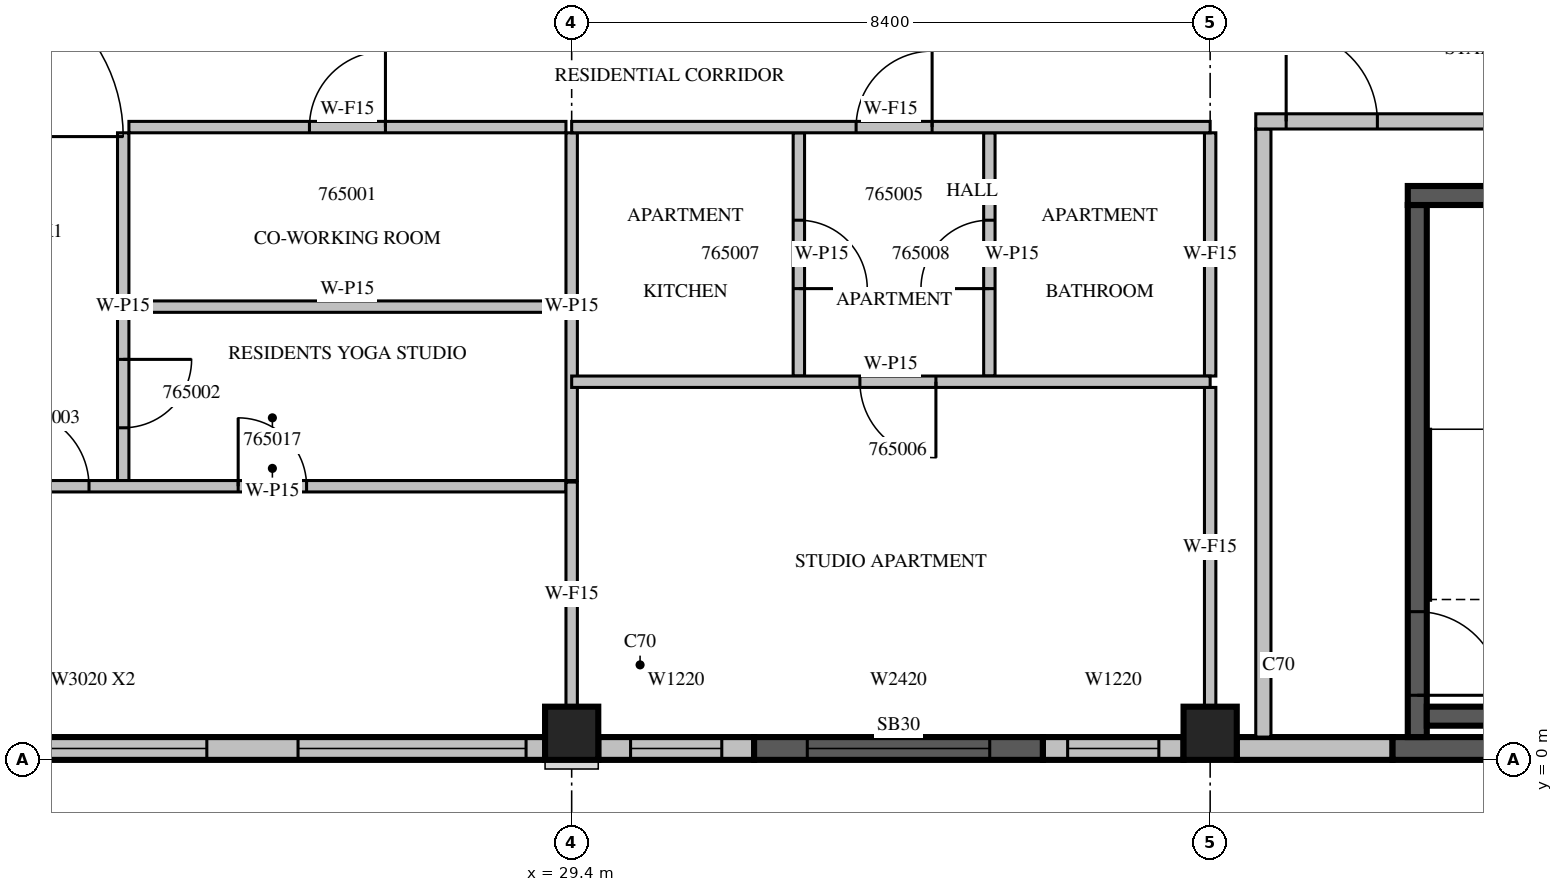
"""IFC4 building model, lengths in metres.
Left out: names, types, materials, properties, quantities, classifications, styles, units other than length and angle.
Written with IfcOpenShell. Run it as: python <this file> out.ifc"""

import sys

from ifc_helpers import new_model, si_unit, direction, frame, frame_2d, origin, origin_2d, place, context, subcontext, project, spatial, rectangle, extrude, source, transform, mapped, element, fill, save


model = new_model("IFC4")
c1 = context("Model", 3, precision=1e-05, world=origin(), true_north=direction((0.0, 1.0)))
c2 = subcontext(c1, "Body", "Model", "MODEL_VIEW")
j1 = project(units=[si_unit("LENGTHUNIT", "METRE"), si_unit("PLANEANGLEUNIT", "RADIAN")], contexts=[c1])
p1 = place(None, origin())
s1 = spatial("IfcSite", under=j1, at=p1, CompositionType="ELEMENT")
p2 = place(p1, origin())
s2 = spatial("IfcBuilding", under=s1, at=p2, CompositionType="ELEMENT")
p3 = place(p2, frame((0.0, 0.0, 288.0)))
s3 = spatial("IfcBuildingStorey", under=s2, at=p3, CompositionType="ELEMENT", Elevation=288.0)
m1 = source(origin(), c2, "Body", "SweptSolid", [
    extrude(rectangle(XDim=0.7, YDim=0.7, at=origin_2d()), origin(), (0.0, 0.0, 1.0), 3.5),
])
for number, where, z_axis, x_axis in (
    (1, (29.4, 0.35, 0.0), (0.0, 0.0, 1.0), (1.0, 0.0, 0.0)),
    (2, (37.8, 0.35, 0.0), (0.0, 0.0, 1.0), (1.0, 0.0, 0.0)),
):
    element("IfcColumn", number, at=place(p3, frame(where, z_axis=z_axis, x_axis=x_axis)), inside=s3, PredefinedType="COLUMN", context=c2, shape_type="MappedRepresentation", body=[
        mapped(m1, transform((0.0, 0.0, 0.0), scale=1.0)),
    ])
m2 = source(origin(), c2, "Body", "SweptSolid", [
    extrude(rectangle(XDim=7.7, YDim=0.3, at=frame_2d((3.85, 0.0))), origin(), (0.0, 0.0, 1.0), 3.1),
])
p4 = place(p3, frame((21.35, 0.15, 0.0), z_axis=(0.0, 0.0, 1.0), x_axis=(1.0, 0.0, 0.0)))
e3 = element("IfcWall", 3, at=p4, inside=s3, PredefinedType="STANDARD", context=c2, shape_type="MappedRepresentation", body=[
    mapped(m2, transform((0.0, 0.0, 0.0), scale=1.0)),
])
m3 = source(origin(), c2, "Body", "SweptSolid", [
    extrude(rectangle(XDim=3.0, YDim=2.0, at=frame_2d((1.5, 1.0))), frame((0.0, 0.16, 0.0), z_axis=(0.0, -1.0, 0.0), x_axis=(1.0, 0.0, 0.0)), (0.0, 0.0, 1.0), 0.32),
])
p5 = place(p4, frame((0.25, 0.0, 0.6)))
e4 = element("IfcOpeningElement", 4, at=p5, cuts=e3, PredefinedType="OPENING", context=c2, shape_type="MappedRepresentation", body=[
    mapped(m3, transform((0.0, 0.0, 0.0), scale=1.0)),
])
p6 = place(p4, frame((4.45, 0.0, 0.6)))
e5 = element("IfcOpeningElement", 5, at=p6, cuts=e3, PredefinedType="OPENING", context=c2, shape_type="MappedRepresentation", body=[
    mapped(m3, transform((0.0, 0.0, 0.0), scale=1.0)),
])
m4 = source(origin(), c2, "Body", "SweptSolid", [
    extrude(rectangle(XDim=2.05, YDim=0.3, at=frame_2d((1.025, 0.0))), origin(), (0.0, 0.0, 1.0), 3.1),
])
p7 = place(p3, frame((29.75, 0.15, 0.0), z_axis=(0.0, 0.0, 1.0), x_axis=(1.0, 0.0, 0.0)))
e6 = element("IfcWall", 6, at=p7, inside=s3, PredefinedType="STANDARD", context=c2, shape_type="MappedRepresentation", body=[
    mapped(m4, transform((0.0, 0.0, 0.0), scale=1.0)),
])
m5 = source(origin(), c2, "Body", "SweptSolid", [
    extrude(rectangle(XDim=1.2, YDim=2.0, at=frame_2d((0.6, 1.0))), frame((0.0, 0.16, 0.0), z_axis=(0.0, -1.0, 0.0), x_axis=(1.0, 0.0, 0.0)), (0.0, 0.0, 1.0), 0.32),
])
p8 = place(p7, frame((0.425, 0.0, 0.6)))
e7 = element("IfcOpeningElement", 7, at=p8, cuts=e6, PredefinedType="OPENING", context=c2, shape_type="MappedRepresentation", body=[
    mapped(m5, transform((0.0, 0.0, 0.0), scale=1.0)),
])
m6 = source(origin(), c2, "Body", "SweptSolid", [
    extrude(rectangle(XDim=3.8, YDim=0.3, at=frame_2d((1.9, 0.0))), origin(), (0.0, 0.0, 1.0), 3.1),
])
p9 = place(p3, frame((31.8, 0.15, 0.0), z_axis=(0.0, 0.0, 1.0), x_axis=(1.0, 0.0, 0.0)))
e8 = element("IfcWall", 8, at=p9, inside=s3, PredefinedType="SOLIDWALL", context=c2, shape_type="MappedRepresentation", body=[
    mapped(m6, transform((0.0, 0.0, 0.0), scale=1.0)),
])
m7 = source(origin(), c2, "Body", "SweptSolid", [
    extrude(rectangle(XDim=2.4, YDim=2.0, at=frame_2d((1.2, 1.0))), frame((0.0, 0.16, 0.0), z_axis=(0.0, -1.0, 0.0), x_axis=(1.0, 0.0, 0.0)), (0.0, 0.0, 1.0), 0.32),
])
p10 = place(p9, frame((0.7, 0.0, 0.6)))
e9 = element("IfcOpeningElement", 9, at=p10, cuts=e8, PredefinedType="OPENING", context=c2, shape_type="MappedRepresentation", body=[
    mapped(m7, transform((0.0, 0.0, 0.0), scale=1.0)),
])
m8 = source(origin(), c2, "Body", "SweptSolid", [
    extrude(rectangle(XDim=1.85, YDim=0.3, at=frame_2d((0.925, 0.0))), origin(), (0.0, 0.0, 1.0), 3.1),
])
p11 = place(p3, frame((35.6, 0.15, 0.0), z_axis=(0.0, 0.0, 1.0), x_axis=(1.0, 0.0, 0.0)))
e10 = element("IfcWall", 10, at=p11, inside=s3, PredefinedType="STANDARD", context=c2, shape_type="MappedRepresentation", body=[
    mapped(m8, transform((0.0, 0.0, 0.0), scale=1.0)),
])
p12 = place(p11, frame((0.325, 0.0, 0.6)))
e11 = element("IfcOpeningElement", 11, at=p12, cuts=e10, PredefinedType="OPENING", context=c2, shape_type="MappedRepresentation", body=[
    mapped(m5, transform((0.0, 0.0, 0.0), scale=1.0)),
])
p13 = place(p3, frame((38.15, 0.15, 0.0), z_axis=(0.0, 0.0, 1.0), x_axis=(1.0, 0.0, 0.0)))
e12 = element("IfcWall", 12, at=p13, inside=s3, PredefinedType="STANDARD", context=c2, shape_type="MappedRepresentation", body=[
    mapped(m4, transform((0.0, 0.0, 0.0), scale=1.0)),
])
p14 = place(p3, frame((40.2, 0.15, 0.0), z_axis=(0.0, 0.0, 1.0), x_axis=(1.0, 0.0, 0.0)))
e13 = element("IfcWall", 13, at=p14, inside=s3, PredefinedType="SOLIDWALL", context=c2, shape_type="MappedRepresentation", body=[
    mapped(m6, transform((0.0, 0.0, 0.0), scale=1.0)),
])
m9 = source(origin(), c2, "Body", "SweptSolid", [
    extrude(rectangle(XDim=7.0, YDim=0.25, at=frame_2d((3.5, 0.0))), origin(), (0.0, 0.0, 1.0), 3.1),
])
p15 = place(p3, frame((40.525, 0.3, 0.0), z_axis=(0.0, 0.0, 1.0), x_axis=(0.0, 1.0, 0.0)))
e14 = element("IfcWall", 14, at=p15, inside=s3, PredefinedType="SOLIDWALL", context=c2, shape_type="MappedRepresentation", body=[
    mapped(m9, transform((0.0, 0.0, 0.0), scale=1.0)),
])
m10 = source(origin(), c2, "Body", "SweptSolid", [
    extrude(rectangle(XDim=1.1, YDim=2.1, at=frame_2d((0.55, 1.05))), frame((0.0, 0.135, 0.0), z_axis=(0.0, -1.0, 0.0), x_axis=(1.0, 0.0, 0.0)), (0.0, 0.0, 1.0), 0.27),
])
p16 = place(p15, frame((0.55, 0.0, 0.0)))
e15 = element("IfcOpeningElement", 15, at=p16, cuts=e14, PredefinedType="OPENING", context=c2, shape_type="MappedRepresentation", body=[
    mapped(m10, transform((0.0, 0.0, 0.0), scale=1.0)),
])
m11 = source(origin(), c2, "Body", "SweptSolid", [
    extrude(rectangle(XDim=3.45, YDim=0.25, at=frame_2d((1.725, 0.0))), origin(), (0.0, 0.0, 1.0), 3.1),
])
p17 = place(p3, frame((40.4, 7.425, 0.0), z_axis=(0.0, 0.0, 1.0), x_axis=(1.0, 0.0, 0.0)))
e16 = element("IfcWall", 16, at=p17, inside=s3, PredefinedType="SOLIDWALL", context=c2, shape_type="MappedRepresentation", body=[
    mapped(m11, transform((0.0, 0.0, 0.0), scale=1.0)),
])
m12 = source(origin(), c2, "Body", "SweptSolid", [
    extrude(rectangle(XDim=2.95, YDim=0.25, at=frame_2d((1.475, 0.0))), origin(), (0.0, 0.0, 1.0), 3.1),
])
p18 = place(p3, frame((40.65, 0.575, 0.0), z_axis=(0.0, 0.0, 1.0), x_axis=(1.0, 0.0, 0.0)))
e17 = element("IfcWall", 17, at=p18, inside=s3, PredefinedType="SOLIDWALL", context=c2, shape_type="MappedRepresentation", body=[
    mapped(m12, transform((0.0, 0.0, 0.0), scale=1.0)),
])
m13 = source(origin(), c2, "Body", "SweptSolid", [
    extrude(rectangle(XDim=8.0, YDim=0.2, at=frame_2d((4.0, 0.0))), origin(), (0.0, 0.0, 1.0), 3.1),
])
p19 = place(p3, frame((38.5, 0.3, 0.0), z_axis=(0.0, 0.0, 1.0), x_axis=(0.0, 1.0, 0.0)))
e18 = element("IfcWall", 18, at=p19, inside=s3, PredefinedType="PARTITIONING", context=c2, shape_type="MappedRepresentation", body=[
    mapped(m13, transform((0.0, 0.0, 0.0), scale=1.0)),
])
m14 = source(origin(), c2, "Body", "SweptSolid", [
    extrude(rectangle(XDim=5.45, YDim=0.2, at=frame_2d((2.725, 0.0))), origin(), (0.0, 0.0, 1.0), 3.1),
])
p20 = place(p3, frame((38.4, 8.4, 0.0), z_axis=(0.0, 0.0, 1.0), x_axis=(1.0, 0.0, 0.0)))
e19 = element("IfcWall", 19, at=p20, inside=s3, PredefinedType="PARTITIONING", context=c2, shape_type="MappedRepresentation", body=[
    mapped(m14, transform((0.0, 0.0, 0.0), scale=1.0)),
])
m15 = source(origin(), c2, "Body", "SweptSolid", [
    extrude(rectangle(XDim=1.2, YDim=2.1, at=frame_2d((0.6, 1.05))), frame((0.0, 0.11, 0.0), z_axis=(0.0, -1.0, 0.0), x_axis=(1.0, 0.0, 0.0)), (0.0, 0.0, 1.0), 0.22),
])
p21 = place(p20, frame((0.4, 0.0, 0.0)))
e20 = element("IfcOpeningElement", 20, at=p21, cuts=e19, PredefinedType="OPENING", context=c2, shape_type="MappedRepresentation", body=[
    mapped(m15, transform((0.0, 0.0, 0.0), scale=1.0)),
])
m16 = source(origin(), c2, "Body", "SweptSolid", [
    extrude(rectangle(XDim=0.9, YDim=2.1, at=frame_2d((0.45, 1.05))), frame((0.0, 0.11, 0.0), z_axis=(0.0, -1.0, 0.0), x_axis=(1.0, 0.0, 0.0)), (0.0, 0.0, 1.0), 0.22),
])
p22 = place(p20, frame((3.25, 0.0, 0.0)))
e21 = element("IfcOpeningElement", 21, at=p22, cuts=e19, PredefinedType="OPENING", context=c2, shape_type="MappedRepresentation", body=[
    mapped(m16, transform((0.0, 0.0, 0.0), scale=1.0)),
])
m17 = source(origin(), c2, "Body", "SweptSolid", [
    extrude(rectangle(XDim=4.575, YDim=0.15, at=frame_2d((2.288, 0.0))), origin(), (0.0, 0.0, 1.0), 3.1),
])
p23 = place(p3, frame((23.5, 8.25, 0.0), z_axis=(0.0, 0.0, 1.0), x_axis=(0.0, -1.0, 0.0)))
e22 = element("IfcWall", 22, at=p23, inside=s3, PredefinedType="PARTITIONING", context=c2, shape_type="MappedRepresentation", body=[
    mapped(m17, transform((0.0, 0.0, 0.0), scale=1.0)),
])
m18 = source(origin(), c2, "Body", "SweptSolid", [
    extrude(rectangle(XDim=0.9, YDim=2.1, at=frame_2d((0.45, 1.05))), frame((0.0, 0.085, 0.0), z_axis=(0.0, -1.0, 0.0), x_axis=(1.0, 0.0, 0.0)), (0.0, 0.0, 1.0), 0.17),
])
p24 = place(p23, frame((2.981, 0.0, 0.0)))
e23 = element("IfcOpeningElement", 23, at=p24, cuts=e22, PredefinedType="OPENING", context=c2, shape_type="MappedRepresentation", body=[
    mapped(m18, transform((0.0, 0.0, 0.0), scale=1.0)),
])
p25 = place(p3, frame((29.4, 3.675, 0.0), z_axis=(0.0, 0.0, 1.0), x_axis=(0.0, 1.0, 0.0)))
e24 = element("IfcWall", 24, at=p25, inside=s3, PredefinedType="PARTITIONING", context=c2, shape_type="MappedRepresentation", body=[
    mapped(m17, transform((0.0, 0.0, 0.0), scale=1.0)),
])
m19 = source(origin(), c2, "Body", "SweptSolid", [
    extrude(rectangle(XDim=5.75, YDim=0.15, at=frame_2d((2.875, 0.0))), origin(), (0.0, 0.0, 1.0), 3.1),
])
p26 = place(p3, frame((29.325, 8.325, 0.0), z_axis=(0.0, 0.0, 1.0), x_axis=(-1.0, 0.0, 0.0)))
e25 = element("IfcWall", 25, at=p26, inside=s3, PredefinedType="PARTITIONING", context=c2, shape_type="MappedRepresentation", body=[
    mapped(m19, transform((0.0, 0.0, 0.0), scale=1.0)),
])
m20 = source(origin(), c2, "Body", "SweptSolid", [
    extrude(rectangle(XDim=1.0, YDim=2.1, at=frame_2d((0.5, 1.05))), frame((0.0, 0.085, 0.0), z_axis=(0.0, -1.0, 0.0), x_axis=(1.0, 0.0, 0.0)), (0.0, 0.0, 1.0), 0.17),
])
p27 = place(p26, frame((2.375, 0.0, 0.0)))
e26 = element("IfcOpeningElement", 26, at=p27, cuts=e25, PredefinedType="OPENING", context=c2, shape_type="MappedRepresentation", body=[
    mapped(m20, transform((0.0, 0.0, 0.0), scale=1.0)),
])
p28 = place(p3, frame((29.325, 5.963, 0.0), z_axis=(0.0, 0.0, 1.0), x_axis=(-1.0, 0.0, 0.0)))
e27 = element("IfcWall", 27, at=p28, inside=s3, PredefinedType="PARTITIONING", context=c2, shape_type="MappedRepresentation", body=[
    mapped(m19, transform((0.0, 0.0, 0.0), scale=1.0)),
])
m21 = source(origin(), c2, "Body", "SweptSolid", [
    extrude(rectangle(XDim=7.725, YDim=0.15, at=frame_2d((3.862, 0.0))), origin(), (0.0, 0.0, 1.0), 3.1),
])
p29 = place(p3, frame((21.6, 3.6, 0.0), z_axis=(0.0, 0.0, 1.0), x_axis=(1.0, 0.0, 0.0)))
e28 = element("IfcWall", 28, at=p29, inside=s3, PredefinedType="PARTITIONING", context=c2, shape_type="MappedRepresentation", body=[
    mapped(m21, transform((0.0, 0.0, 0.0), scale=1.0)),
])
p30 = place(p29, frame((0.45, 0.0, 0.0)))
e29 = element("IfcOpeningElement", 29, at=p30, cuts=e28, PredefinedType="OPENING", context=c2, shape_type="MappedRepresentation", body=[
    mapped(m20, transform((0.0, 0.0, 0.0), scale=1.0)),
])
p31 = place(p29, frame((3.413, 0.0, 0.0)))
e30 = element("IfcOpeningElement", 30, at=p31, cuts=e28, PredefinedType="OPENING", context=c2, shape_type="MappedRepresentation", body=[
    mapped(m18, transform((0.0, 0.0, 0.0), scale=1.0)),
])
m22 = source(origin(), c2, "Body", "SweptSolid", [
    extrude(rectangle(XDim=3.2, YDim=0.15, at=frame_2d((1.6, 0.0))), origin(), (0.0, 0.0, 1.0), 3.1),
])
p32 = place(p3, frame((32.389, 5.05, 0.0), z_axis=(0.0, 0.0, 1.0), x_axis=(0.0, 1.0, 0.0)))
e31 = element("IfcWall", 31, at=p32, inside=s3, PredefinedType="PARTITIONING", context=c2, shape_type="MappedRepresentation", body=[
    mapped(m22, transform((0.0, 0.0, 0.0), scale=1.0)),
])
p33 = place(p32, frame((1.15, 0.0, 0.0)))
e32 = element("IfcOpeningElement", 32, at=p33, cuts=e31, PredefinedType="OPENING", context=c2, shape_type="MappedRepresentation", body=[
    mapped(m18, transform((0.0, 0.0, 0.0), scale=1.0)),
])
p34 = place(p3, frame((34.895, 5.05, 0.0), z_axis=(0.0, 0.0, 1.0), x_axis=(0.0, 1.0, 0.0)))
e33 = element("IfcWall", 33, at=p34, inside=s3, PredefinedType="PARTITIONING", context=c2, shape_type="MappedRepresentation", body=[
    mapped(m22, transform((0.0, 0.0, 0.0), scale=1.0)),
])
p35 = place(p34, frame((1.15, 0.0, 0.0)))
e34 = element("IfcOpeningElement", 34, at=p35, cuts=e33, PredefinedType="OPENING", context=c2, shape_type="MappedRepresentation", body=[
    mapped(m18, transform((0.0, 0.0, 0.0), scale=1.0)),
])
m23 = source(origin(), c2, "Body", "SweptSolid", [
    extrude(rectangle(XDim=2.956, YDim=0.15, at=frame_2d((1.478, 0.0))), origin(), (0.0, 0.0, 1.0), 3.1),
])
p36 = place(p3, frame((29.4, 0.699, 0.0), z_axis=(0.0, 0.0, 1.0), x_axis=(0.0, 1.0, 0.0)))
e35 = element("IfcWall", 35, at=p36, inside=s3, PredefinedType="PARTITIONING", context=c2, shape_type="MappedRepresentation", body=[
    mapped(m23, transform((0.0, 0.0, 0.0), scale=1.0)),
])
m24 = source(origin(), c2, "Body", "SweptSolid", [
    extrude(rectangle(XDim=4.201, YDim=0.15, at=frame_2d((2.1, 0.0))), origin(), (0.0, 0.0, 1.0), 3.1),
])
p37 = place(p3, frame((37.8, 0.699, 0.0), z_axis=(0.0, 0.0, 1.0), x_axis=(0.0, 1.0, 0.0)))
e36 = element("IfcWall", 36, at=p37, inside=s3, PredefinedType="PARTITIONING", context=c2, shape_type="MappedRepresentation", body=[
    mapped(m24, transform((0.0, 0.0, 0.0), scale=1.0)),
])
p38 = place(p3, frame((37.8, 5.05, 0.0), z_axis=(0.0, 0.0, 1.0), x_axis=(0.0, 1.0, 0.0)))
e37 = element("IfcWall", 37, at=p38, inside=s3, PredefinedType="PARTITIONING", context=c2, shape_type="MappedRepresentation", body=[
    mapped(m22, transform((0.0, 0.0, 0.0), scale=1.0)),
])
m25 = source(origin(), c2, "Body", "SweptSolid", [
    extrude(rectangle(XDim=8.4, YDim=0.15, at=frame_2d((4.2, 0.0))), origin(), (0.0, 0.0, 1.0), 3.1),
])
p39 = place(p3, frame((37.8, 4.975, 0.0), z_axis=(0.0, 0.0, 1.0), x_axis=(-1.0, 0.0, 0.0)))
e38 = element("IfcWall", 38, at=p39, inside=s3, PredefinedType="PARTITIONING", context=c2, shape_type="MappedRepresentation", body=[
    mapped(m25, transform((0.0, 0.0, 0.0), scale=1.0)),
])
p40 = place(p39, frame((3.608, 0.0, 0.0)))
e39 = element("IfcOpeningElement", 39, at=p40, cuts=e38, PredefinedType="OPENING", context=c2, shape_type="MappedRepresentation", body=[
    mapped(m20, transform((0.0, 0.0, 0.0), scale=1.0)),
])
p41 = place(p3, frame((37.8, 8.325, 0.0), z_axis=(0.0, 0.0, 1.0), x_axis=(-1.0, 0.0, 0.0)))
e40 = element("IfcWall", 40, at=p41, inside=s3, PredefinedType="PARTITIONING", context=c2, shape_type="MappedRepresentation", body=[
    mapped(m25, transform((0.0, 0.0, 0.0), scale=1.0)),
])
p42 = place(p41, frame((3.658, 0.0, 0.0)))
e41 = element("IfcOpeningElement", 41, at=p42, cuts=e40, PredefinedType="OPENING", context=c2, shape_type="MappedRepresentation", body=[
    mapped(m20, transform((0.0, 0.0, 0.0), scale=1.0)),
])
m26 = source(origin(), c2, "Body", "SweptSolid", [
    extrude(rectangle(XDim=3.0, YDim=2.0, at=frame_2d((1.5, 1.0))), frame((0.0, 0.03, 0.0), z_axis=(0.0, -1.0, 0.0), x_axis=(1.0, 0.0, 0.0)), (0.0, 0.0, 1.0), 0.06),
])
p43 = place(p5, origin())
e42 = element("IfcWindow", 42, at=p43, inside=s3, PartitioningType="SINGLE_PANEL", PredefinedType="WINDOW", context=c2, shape_type="MappedRepresentation", body=[
    mapped(m26, transform((0.0, 0.0, 0.0), scale=1.0)),
])
fill(e4, e42)
p44 = place(p6, origin())
e43 = element("IfcWindow", 43, at=p44, inside=s3, PartitioningType="SINGLE_PANEL", PredefinedType="WINDOW", context=c2, shape_type="MappedRepresentation", body=[
    mapped(m26, transform((0.0, 0.0, 0.0), scale=1.0)),
])
fill(e5, e43)
m27 = source(origin(), c2, "Body", "SweptSolid", [
    extrude(rectangle(XDim=1.2, YDim=2.0, at=frame_2d((0.6, 1.0))), frame((0.0, 0.03, 0.0), z_axis=(0.0, -1.0, 0.0), x_axis=(1.0, 0.0, 0.0)), (0.0, 0.0, 1.0), 0.06),
])
p45 = place(p8, origin())
e44 = element("IfcWindow", 44, at=p45, inside=s3, PartitioningType="SINGLE_PANEL", PredefinedType="WINDOW", context=c2, shape_type="MappedRepresentation", body=[
    mapped(m27, transform((0.0, 0.0, 0.0), scale=1.0)),
])
fill(e7, e44)
m28 = source(origin(), c2, "Body", "SweptSolid", [
    extrude(rectangle(XDim=2.4, YDim=2.0, at=frame_2d((1.2, 1.0))), frame((0.0, 0.03, 0.0), z_axis=(0.0, -1.0, 0.0), x_axis=(1.0, 0.0, 0.0)), (0.0, 0.0, 1.0), 0.06),
])
p46 = place(p10, origin())
e45 = element("IfcWindow", 45, at=p46, inside=s3, PartitioningType="SINGLE_PANEL", PredefinedType="WINDOW", context=c2, shape_type="MappedRepresentation", body=[
    mapped(m28, transform((0.0, 0.0, 0.0), scale=1.0)),
])
fill(e9, e45)
p47 = place(p12, origin())
e46 = element("IfcWindow", 46, at=p47, inside=s3, PartitioningType="SINGLE_PANEL", PredefinedType="WINDOW", context=c2, shape_type="MappedRepresentation", body=[
    mapped(m27, transform((0.0, 0.0, 0.0), scale=1.0)),
])
fill(e11, e46)
m29 = source(origin(), c2, "Body", "SweptSolid", [
    extrude(rectangle(XDim=1.1, YDim=2.1, at=frame_2d((0.55, 1.05))), frame((0.0, 0.025, 0.0), z_axis=(0.0, -1.0, 0.0), x_axis=(1.0, 0.0, 0.0)), (0.0, 0.0, 1.0), 0.05),
])
p48 = place(p16, origin())
e47 = element("IfcDoor", 47, at=p48, inside=s3, OperationType="SINGLE_SWING_RIGHT", PredefinedType="DOOR", context=c2, shape_type="MappedRepresentation", body=[
    mapped(m29, transform((0.0, 0.0, 0.0), scale=1.0)),
])
fill(e15, e47)
m30 = source(origin(), c2, "Body", "SweptSolid", [
    extrude(rectangle(XDim=1.2, YDim=2.1, at=frame_2d((0.6, 1.05))), frame((0.0, 0.025, 0.0), z_axis=(0.0, -1.0, 0.0), x_axis=(1.0, 0.0, 0.0)), (0.0, 0.0, 1.0), 0.05),
])
p49 = place(p21, origin())
e48 = element("IfcDoor", 48, at=p49, inside=s3, OperationType="SINGLE_SWING_LEFT", PredefinedType="DOOR", context=c2, shape_type="MappedRepresentation", body=[
    mapped(m30, transform((0.0, 0.0, 0.0), scale=1.0)),
])
fill(e20, e48)
m31 = source(origin(), c2, "Body", "SweptSolid", [
    extrude(rectangle(XDim=1.0, YDim=2.1, at=frame_2d((0.5, 1.05))), frame((0.0, 0.025, 0.0), z_axis=(0.0, -1.0, 0.0), x_axis=(1.0, 0.0, 0.0)), (0.0, 0.0, 1.0), 0.05),
])
p50 = place(p27, origin())
e49 = element("IfcDoor", 49, at=p50, inside=s3, OperationType="SINGLE_SWING_RIGHT", PredefinedType="DOOR", context=c2, shape_type="MappedRepresentation", body=[
    mapped(m31, transform((0.0, 0.0, 0.0), scale=1.0)),
])
fill(e26, e49)
m32 = source(origin(), c2, "Body", "SweptSolid", [
    extrude(rectangle(XDim=0.9, YDim=2.1, at=frame_2d((0.45, 1.05))), frame((0.0, 0.025, 0.0), z_axis=(0.0, -1.0, 0.0), x_axis=(1.0, 0.0, 0.0)), (0.0, 0.0, 1.0), 0.05),
])
p51 = place(p24, origin())
e50 = element("IfcDoor", 50, at=p51, inside=s3, OperationType="SINGLE_SWING_LEFT", PredefinedType="DOOR", context=c2, shape_type="MappedRepresentation", body=[
    mapped(m32, transform((0.0, 0.0, 0.0), scale=1.0)),
])
fill(e23, e50)
p52 = place(p30, origin())
e51 = element("IfcDoor", 51, at=p52, inside=s3, OperationType="SINGLE_SWING_LEFT", PredefinedType="DOOR", context=c2, shape_type="MappedRepresentation", body=[
    mapped(m31, transform((0.0, 0.0, 0.0), scale=1.0)),
])
fill(e29, e51)
p53 = place(p42, origin())
e52 = element("IfcDoor", 52, at=p53, inside=s3, OperationType="SINGLE_SWING_RIGHT", PredefinedType="DOOR", context=c2, shape_type="MappedRepresentation", body=[
    mapped(m31, transform((0.0, 0.0, 0.0), scale=1.0)),
])
fill(e41, e52)
p54 = place(p40, origin())
e53 = element("IfcDoor", 53, at=p54, inside=s3, OperationType="SINGLE_SWING_LEFT", PredefinedType="DOOR", context=c2, shape_type="MappedRepresentation", body=[
    mapped(m31, transform((0.0, 0.0, 0.0), scale=1.0)),
])
fill(e39, e53)
p55 = place(p33, origin())
e54 = element("IfcDoor", 54, at=p55, inside=s3, OperationType="SINGLE_SWING_RIGHT", PredefinedType="DOOR", context=c2, shape_type="MappedRepresentation", body=[
    mapped(m32, transform((0.0, 0.0, 0.0), scale=1.0)),
])
fill(e32, e54)
p56 = place(p35, origin())
e55 = element("IfcDoor", 55, at=p56, inside=s3, OperationType="SINGLE_SWING_LEFT", PredefinedType="DOOR", context=c2, shape_type="MappedRepresentation", body=[
    mapped(m32, transform((0.0, 0.0, 0.0), scale=1.0)),
])
fill(e34, e55)
p57 = place(p31, origin())
e56 = element("IfcDoor", 56, at=p57, inside=s3, OperationType="SINGLE_SWING_LEFT", PredefinedType="DOOR", context=c2, shape_type="MappedRepresentation", body=[
    mapped(m32, transform((0.0, 0.0, 0.0), scale=1.0)),
])
fill(e30, e56)
save(model, sys.argv[1])
